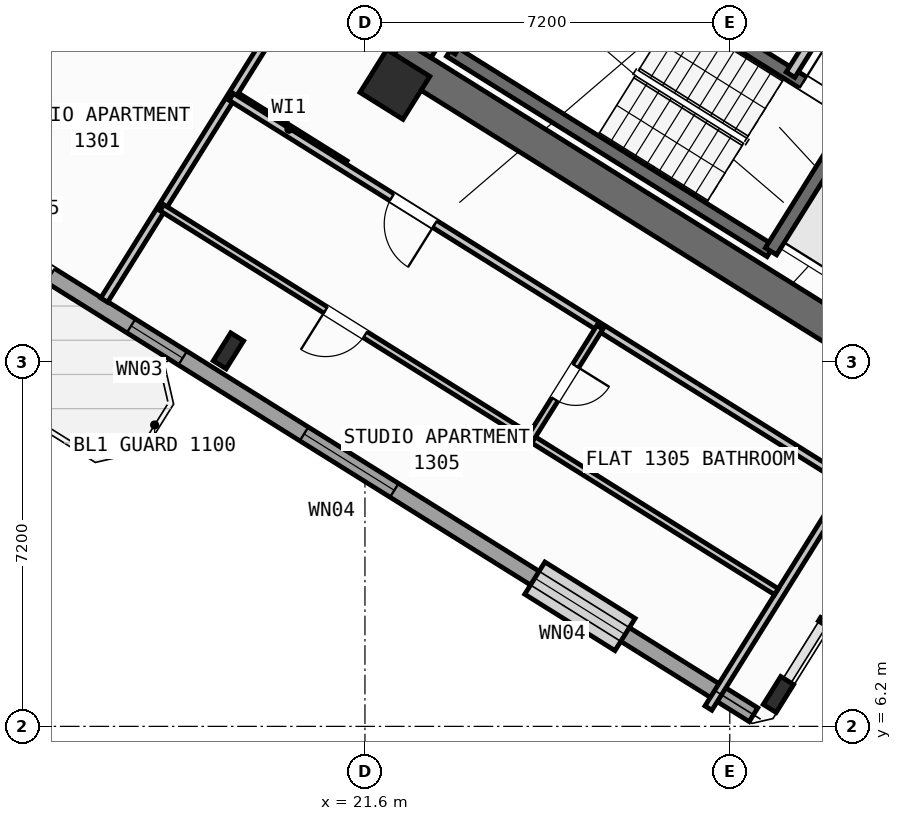
"""IFC4 building model, lengths in metres.
Left out: names, types, materials, properties, quantities, classifications, styles, units other than length and angle.
Written with IfcOpenShell. Run it as: python <this file> out.ifc"""

import sys

from ifc_helpers import new_model, si_unit, direction, frame, frame_2d, origin, origin_2d, place, context, subcontext, project, spatial, rectangle, hollow_rectangle, i_section, extrude, source, transform, mapped, element, fill, save


model = new_model("IFC4")
c1 = context("Model", 3, precision=1e-05, world=origin(), true_north=direction((0.0, 1.0)))
c2 = subcontext(c1, "Body", "Model", "MODEL_VIEW")
j1 = project(units=[si_unit("LENGTHUNIT", "METRE"), si_unit("PLANEANGLEUNIT", "RADIAN")], contexts=[c1])
p1 = place(None, origin())
s1 = spatial("IfcSite", under=j1, at=p1, CompositionType="ELEMENT")
p2 = place(p1, origin())
s2 = spatial("IfcBuilding", under=s1, at=p2, CompositionType="ELEMENT")
p3 = place(p2, frame((0.0, 0.0, 52.8)))
s3 = spatial("IfcBuildingStorey", under=s2, at=p3, CompositionType="ELEMENT", Elevation=52.8)
p4 = place(p3, frame((33.409, 12.45, 0.0), z_axis=(0.0, 0.0, 1.0), x_axis=(-0.848051132073, 0.529914405721, 0.0)))
e1 = element("IfcWall", 1, at=p4, inside=s3, PredefinedType="SHEAR", context=c2, shape_type="SweptSolid", body=[
    extrude(rectangle(XDim=13.24, YDim=0.65, at=frame_2d((6.62, 0.0))), origin(), (0.0, 0.0, 1.0), 3.35),
])
p5 = place(p3, frame((26.007, 24.976, 0.0), z_axis=(0.0, 0.0, 1.0), x_axis=(-0.529916319127, -0.848049936456, 0.0)))
e2 = element("IfcWall", 2, at=p5, inside=s3, PredefinedType="SHEAR", context=c2, shape_type="SweptSolid", body=[
    extrude(rectangle(XDim=6.375, YDim=0.65, at=frame_2d((3.188, 0.0))), origin(), (0.0, 0.0, 1.0), 3.35),
])
m1 = source(origin(), c2, "Body", "SweptSolid", [
    extrude(i_section(OverallWidth=0.3, OverallDepth=0.65, WebThickness=0.016, FlangeThickness=0.031, at=origin_2d()), origin(), (0.0, 0.0, 1.0), 3.6),
])
p6 = place(p3, frame((29.761, 6.829, 0.0), z_axis=(0.0, 0.0, 1.0), x_axis=(-0.848048096156, 0.529919264233, 0.0)))
e3 = element("IfcColumn", 3, at=p6, inside=s3, PredefinedType="COLUMN", context=c2, shape_type="MappedRepresentation", body=[
    mapped(m1, transform((0.0, 0.0, 0.0), scale=1.0)),
])
m2 = source(origin(), c2, "Body", "SweptSolid", [
    extrude(hollow_rectangle(XDim=1.0, YDim=1.0, WallThickness=0.04, at=origin_2d()), origin(), (0.0, 0.0, 1.0), 3.6),
])
p7 = place(p3, frame((22.191, 18.87, 0.0), z_axis=(0.0, 0.0, 1.0), x_axis=(-0.848048096156, 0.529919264233, 0.0)))
e4 = element("IfcColumn", 4, at=p7, inside=s3, PredefinedType="COLUMN", context=c2, shape_type="MappedRepresentation", body=[
    mapped(m2, transform((0.0, 0.0, 0.0), scale=1.0)),
])
p8 = place(p3, frame((18.906, 13.612, 0.0), z_axis=(0.0, 0.0, 1.0), x_axis=(-0.848048096156, 0.529919264233, 0.0)))
e5 = element("IfcColumn", 5, at=p8, inside=s3, PredefinedType="COLUMN", context=c2, shape_type="MappedRepresentation", body=[
    mapped(m1, transform((0.0, 0.0, 0.0), scale=1.0)),
])
p9 = place(p3, frame((29.268, 6.429, 0.0), z_axis=(0.0, 0.0, 1.0), x_axis=(-0.848049971435, 0.529916263149, 0.0)))
e6 = element("IfcWall", 6, at=p9, inside=s3, PredefinedType="STANDARD", context=c2, shape_type="SweptSolid", body=[
    extrude(rectangle(XDim=31.588, YDim=0.32, at=frame_2d((15.794, 0.0))), origin(), (0.0, 0.0, 1.0), 3.35),
])
p10 = place(p9, frame((16.362, 0.0, 0.0)))
e7 = element("IfcOpeningElement", 7, at=p10, cuts=e6, PredefinedType="OPENING", context=c2, shape_type="SweptSolid", body=[
    extrude(rectangle(XDim=1.2, YDim=2.15, at=frame_2d((0.6, 1.075))), frame((0.0, 0.17, 0.0), z_axis=(0.0, -1.0, 0.0), x_axis=(1.0, 0.0, 0.0)), (0.0, 0.0, 1.0), 0.34),
])
p11 = place(p9, frame((2.989, 0.0, 0.8)))
e8 = element("IfcOpeningElement", 8, at=p11, cuts=e6, PredefinedType="OPENING", context=c2, shape_type="SweptSolid", body=[
    extrude(rectangle(XDim=2.1, YDim=1.55, at=frame_2d((1.05, 0.775))), frame((0.0, 0.17, 0.0), z_axis=(0.0, -1.0, 0.0), x_axis=(1.0, 0.0, 0.0)), (0.0, 0.0, 1.0), 0.34),
])
p12 = place(p9, frame((8.359, 0.0, 0.8)))
e9 = element("IfcOpeningElement", 9, at=p12, cuts=e6, PredefinedType="OPENING", context=c2, shape_type="SweptSolid", body=[
    extrude(rectangle(XDim=2.1, YDim=1.55, at=frame_2d((1.05, 0.775))), frame((0.0, 0.17, 0.0), z_axis=(0.0, -1.0, 0.0), x_axis=(1.0, 0.0, 0.0)), (0.0, 0.0, 1.0), 0.34),
])
p13 = place(p9, frame((13.284, 0.0, 0.95)))
e10 = element("IfcOpeningElement", 10, at=p13, cuts=e6, PredefinedType="OPENING", context=c2, shape_type="SweptSolid", body=[
    extrude(rectangle(XDim=1.2, YDim=1.4, at=frame_2d((0.6, 0.7))), frame((0.0, 0.17, 0.0), z_axis=(0.0, -1.0, 0.0), x_axis=(1.0, 0.0, 0.0)), (0.0, 0.0, 1.0), 0.34),
])
p14 = place(p9, frame((20.259, 0.0, 0.95)))
e11 = element("IfcOpeningElement", 11, at=p14, cuts=e6, PredefinedType="OPENING", context=c2, shape_type="SweptSolid", body=[
    extrude(rectangle(XDim=1.2, YDim=1.4, at=frame_2d((0.6, 0.7))), frame((0.0, 0.17, 0.0), z_axis=(0.0, -1.0, 0.0), x_axis=(1.0, 0.0, 0.0)), (0.0, 0.0, 1.0), 0.34),
])
p15 = place(p9, frame((22.929, 0.0, 0.95)))
e12 = element("IfcOpeningElement", 12, at=p15, cuts=e6, PredefinedType="OPENING", context=c2, shape_type="SweptSolid", body=[
    extrude(rectangle(XDim=1.2, YDim=1.4, at=frame_2d((0.6, 0.7))), frame((0.0, 0.17, 0.0), z_axis=(0.0, -1.0, 0.0), x_axis=(1.0, 0.0, 0.0)), (0.0, 0.0, 1.0), 0.34),
])
p16 = place(p9, frame((26.106, 0.0, 0.85)))
e13 = element("IfcOpeningElement", 13, at=p16, cuts=e6, PredefinedType="OPENING", context=c2, shape_type="SweptSolid", body=[
    extrude(rectangle(XDim=1.5, YDim=1.5, at=frame_2d((0.75, 0.75))), frame((0.0, 0.17, 0.0), z_axis=(0.0, -1.0, 0.0), x_axis=(1.0, 0.0, 0.0)), (0.0, 0.0, 1.0), 0.34),
])
p17 = place(p9, frame((29.068, 0.0, 0.85)))
e14 = element("IfcOpeningElement", 14, at=p17, cuts=e6, PredefinedType="OPENING", context=c2, shape_type="SweptSolid", body=[
    extrude(rectangle(XDim=1.8, YDim=1.5, at=frame_2d((0.9, 0.75))), frame((0.0, 0.17, 0.0), z_axis=(0.0, -1.0, 0.0), x_axis=(1.0, 0.0, 0.0)), (0.0, 0.0, 1.0), 0.34),
])
p18 = place(p3, frame((29.605, 15.581, 0.0), z_axis=(0.0, 0.0, 1.0), x_axis=(-0.848036911448, 0.529937163087, 0.0)))
e15 = element("IfcWall", 15, at=p18, inside=s3, PredefinedType="SHEAR", context=c2, shape_type="SweptSolid", body=[
    extrude(rectangle(XDim=7.46, YDim=0.26, at=frame_2d((3.73, 0.0))), origin(), (0.0, 0.0, 1.0), 3.35),
])
p19 = place(p3, frame((31.28, 18.261, 0.0), z_axis=(0.0, 0.0, 1.0), x_axis=(-0.848051618787, 0.529913626805, 0.0)))
e16 = element("IfcWall", 16, at=p19, inside=s3, PredefinedType="SHEAR", context=c2, shape_type="SweptSolid", body=[
    extrude(rectangle(XDim=7.46, YDim=0.26, at=frame_2d((3.73, 0.0))), origin(), (0.0, 0.0, 1.0), 3.35),
])
p20 = place(p19, frame((0.36, 0.0, 0.0)))
e17 = element("IfcOpeningElement", 17, at=p20, cuts=e16, PredefinedType="OPENING", context=c2, shape_type="SweptSolid", body=[
    extrude(rectangle(XDim=0.86, YDim=2.05, at=frame_2d((0.43, 1.025))), frame((0.0, 0.14, 0.0), z_axis=(0.0, -1.0, 0.0), x_axis=(1.0, 0.0, 0.0)), (0.0, 0.0, 1.0), 0.28),
])
p21 = place(p3, frame((31.288, 18.256, 0.0), z_axis=(0.0, 0.0, 1.0), x_axis=(-0.529943379326, -0.848033026897, 0.0)))
e18 = element("IfcWall", 18, at=p21, inside=s3, PredefinedType="SHEAR", context=c2, shape_type="SweptSolid", body=[
    extrude(rectangle(XDim=3.16, YDim=0.26, at=frame_2d((1.58, 0.0))), origin(), (0.0, 0.0, 1.0), 3.35),
])
p22 = place(p3, frame((24.945, 22.22, 0.0), z_axis=(0.0, 0.0, 1.0), x_axis=(-0.529908658664, -0.84805472316, 0.0)))
e19 = element("IfcWall", 19, at=p22, inside=s3, PredefinedType="SHEAR", context=c2, shape_type="SweptSolid", body=[
    extrude(rectangle(XDim=3.16, YDim=0.26, at=frame_2d((1.58, 0.0))), origin(), (0.0, 0.0, 1.0), 3.35),
])
p23 = place(p3, frame((31.525, 21.504, 0.0), z_axis=(0.0, 0.0, 1.0), x_axis=(-0.529907497854, -0.848055448493, 0.0)))
e20 = element("IfcWall", 20, at=p23, inside=s3, PredefinedType="STANDARD", context=c2, shape_type="SweptSolid", body=[
    extrude(rectangle(XDim=2.88, YDim=0.2, at=frame_2d((1.44, 0.0))), origin(), (0.0, 0.0, 1.0), 3.34),
])
p24 = place(p3, frame((21.206, 17.292, 0.0), z_axis=(0.0, 0.0, 1.0), x_axis=(-0.848050851465, 0.529914854792, 0.0)))
e21 = element("IfcWall", 21, at=p24, inside=s3, PredefinedType="PARTITIONING", context=c2, shape_type="SweptSolid", body=[
    extrude(rectangle(XDim=2.61, YDim=0.16, at=frame_2d((1.305, 0.0))), origin(), (0.0, 0.0, 1.0), 3.34),
])
p25 = place(p3, frame((21.938, 23.391, 0.0), z_axis=(0.0, 0.0, 1.0), x_axis=(-0.529924725692, -0.848044683434, 0.0)))
e22 = element("IfcWall", 22, at=p25, inside=s3, PredefinedType="PARTITIONING", context=c2, shape_type="SweptSolid", body=[
    extrude(rectangle(XDim=10.35, YDim=0.16, at=frame_2d((5.175, 0.0))), origin(), (0.0, 0.0, 1.0), 3.34),
])
p26 = place(p3, frame((16.492, 21.827, 0.0), z_axis=(0.0, 0.0, 1.0), x_axis=(-0.529904608059, -0.848057254175, 0.0)))
e23 = element("IfcWall", 23, at=p26, inside=s3, PredefinedType="PARTITIONING", context=c2, shape_type="SweptSolid", body=[
    extrude(rectangle(XDim=5.351, YDim=0.16, at=frame_2d((2.675, 0.0))), origin(), (0.0, 0.0, 1.0), 2.725),
])
p27 = place(p3, frame((32.164, 10.374, 0.0), z_axis=(0.0, 0.0, 1.0), x_axis=(-0.848044107957, 0.529925646633, 0.0)))
e24 = element("IfcWall", 24, at=p27, inside=s3, PredefinedType="PARTITIONING", context=c2, shape_type="SweptSolid", body=[
    extrude(rectangle(XDim=15.57, YDim=0.16, at=frame_2d((7.785, 0.0))), origin(), (0.0, 0.0, 1.0), 3.34),
])
p28 = place(p27, frame((10.83, 0.0, 0.0)))
e25 = element("IfcOpeningElement", 25, at=p28, cuts=e24, PredefinedType="OPENING", context=c2, shape_type="SweptSolid", body=[
    extrude(rectangle(XDim=1.0, YDim=2.1, at=frame_2d((0.5, 1.05))), frame((0.0, 0.09, 0.0), z_axis=(0.0, -1.0, 0.0), x_axis=(1.0, 0.0, 0.0)), (0.0, 0.0, 1.0), 0.18),
])
p29 = place(p3, frame((31.282, 11.208, 0.0), z_axis=(0.0, 0.0, 1.0), x_axis=(-0.529938869374, -0.84803584519, 0.0)))
e26 = element("IfcWall", 26, at=p29, inside=s3, PredefinedType="PARTITIONING", context=c2, shape_type="SweptSolid", body=[
    extrude(rectangle(XDim=5.48, YDim=0.16, at=frame_2d((2.74, 0.0))), origin(), (0.0, 0.0, 1.0), 3.34),
])
p30 = place(p3, frame((29.72, 8.859, 0.0), z_axis=(0.0, 0.0, 1.0), x_axis=(-0.848049134363, 0.529917602752, 0.0)))
e27 = element("IfcWall", 27, at=p30, inside=s3, PredefinedType="PLUMBINGWALL", context=c2, shape_type="SweptSolid", body=[
    extrude(rectangle(XDim=14.3, YDim=0.14, at=frame_2d((7.15, 0.0))), origin(), (0.0, 0.0, 1.0), 3.34),
])
p31 = place(p30, frame((9.57, 0.0, 0.0)))
e28 = element("IfcOpeningElement", 28, at=p31, cuts=e27, PredefinedType="OPENING", context=c2, shape_type="SweptSolid", body=[
    extrude(rectangle(XDim=0.92, YDim=2.08, at=frame_2d((0.46, 1.04))), frame((0.0, 0.08, 0.0), z_axis=(0.0, -1.0, 0.0), x_axis=(1.0, 0.0, 0.0)), (0.0, 0.0, 1.0), 0.16),
])
p32 = place(p3, frame((26.237, 14.078, 0.0), z_axis=(0.0, 0.0, 1.0), x_axis=(-0.52995640672, -0.848024885824, 0.0)))
e29 = element("IfcWall", 29, at=p32, inside=s3, PredefinedType="PLUMBINGWALL", context=c2, shape_type="SweptSolid", body=[
    extrude(rectangle(XDim=2.58, YDim=0.14, at=frame_2d((1.29, 0.0))), origin(), (0.0, 0.0, 1.0), 3.34),
])
p33 = place(p32, frame((0.9, 0.0, 0.0)))
e30 = element("IfcOpeningElement", 30, at=p33, cuts=e29, PredefinedType="OPENING", context=c2, shape_type="SweptSolid", body=[
    extrude(rectangle(XDim=0.78, YDim=2.05, at=frame_2d((0.39, 1.025))), frame((0.0, 0.08, 0.0), z_axis=(0.0, -1.0, 0.0), x_axis=(1.0, 0.0, 0.0)), (0.0, 0.0, 1.0), 0.16),
])
m3 = source(origin(), c2, "Body", "SweptSolid", [
    extrude(rectangle(XDim=2.1, YDim=1.55, at=frame_2d((1.05, 0.775))), frame((0.0, 0.03, 0.0), z_axis=(0.0, -1.0, 0.0), x_axis=(1.0, 0.0, 0.0)), (0.0, 0.0, 1.0), 0.06),
])
p34 = place(p11, origin())
e31 = element("IfcWindow", 31, at=p34, inside=s3, PartitioningType="SINGLE_PANEL", PredefinedType="WINDOW", context=c2, shape_type="MappedRepresentation", body=[
    mapped(m3, transform((0.0, 0.0, 0.0), scale=1.0)),
])
fill(e8, e31)
p35 = place(p12, origin())
e32 = element("IfcWindow", 32, at=p35, inside=s3, PartitioningType="SINGLE_PANEL", PredefinedType="WINDOW", context=c2, shape_type="MappedRepresentation", body=[
    mapped(m3, transform((0.0, 0.0, 0.0), scale=1.0)),
])
fill(e9, e32)
m4 = source(origin(), c2, "Body", "SweptSolid", [
    extrude(rectangle(XDim=1.2, YDim=1.4, at=frame_2d((0.6, 0.7))), frame((0.0, 0.03, 0.0), z_axis=(0.0, -1.0, 0.0), x_axis=(1.0, 0.0, 0.0)), (0.0, 0.0, 1.0), 0.06),
])
p36 = place(p13, origin())
e33 = element("IfcWindow", 33, at=p36, inside=s3, PartitioningType="SINGLE_PANEL", PredefinedType="WINDOW", context=c2, shape_type="MappedRepresentation", body=[
    mapped(m4, transform((0.0, 0.0, 0.0), scale=1.0)),
])
fill(e10, e33)
m5 = source(origin(), c2, "Body", "SweptSolid", [
    extrude(rectangle(XDim=0.86, YDim=2.05, at=frame_2d((0.43, 1.025))), frame((0.0, 0.025, 0.0), z_axis=(0.0, -1.0, 0.0), x_axis=(1.0, 0.0, 0.0)), (0.0, 0.0, 1.0), 0.05),
])
p37 = place(p20, frame((0.86, 0.0, 0.0), z_axis=(0.0, 0.0, 1.0), x_axis=(-1.0, 0.0, 0.0)))
e34 = element("IfcDoor", 34, at=p37, inside=s3, OperationType="SINGLE_SWING_LEFT", PredefinedType="DOOR", context=c2, shape_type="MappedRepresentation", body=[
    mapped(m5, transform((0.0, 0.0, 0.0), scale=1.0)),
])
fill(e17, e34)
m6 = source(origin(), c2, "Body", "SweptSolid", [
    extrude(rectangle(XDim=1.0, YDim=2.1, at=frame_2d((0.5, 1.05))), frame((0.0, 0.025, 0.0), z_axis=(0.0, -1.0, 0.0), x_axis=(1.0, 0.0, 0.0)), (0.0, 0.0, 1.0), 0.05),
])
p38 = place(p28, origin())
e35 = element("IfcDoor", 35, at=p38, inside=s3, OperationType="SINGLE_SWING_LEFT", PredefinedType="DOOR", context=c2, shape_type="MappedRepresentation", body=[
    mapped(m6, transform((0.0, 0.0, 0.0), scale=1.0)),
])
fill(e25, e35)
m7 = source(origin(), c2, "Body", "SweptSolid", [
    extrude(rectangle(XDim=0.92, YDim=2.08, at=frame_2d((0.46, 1.04))), frame((0.0, 0.025, 0.0), z_axis=(0.0, -1.0, 0.0), x_axis=(1.0, 0.0, 0.0)), (0.0, 0.0, 1.0), 0.05),
])
p39 = place(p31, origin())
e36 = element("IfcDoor", 36, at=p39, inside=s3, OperationType="SINGLE_SWING_RIGHT", PredefinedType="DOOR", context=c2, shape_type="MappedRepresentation", body=[
    mapped(m7, transform((0.0, 0.0, 0.0), scale=1.0)),
])
fill(e28, e36)
m8 = source(origin(), c2, "Body", "SweptSolid", [
    extrude(rectangle(XDim=0.78, YDim=2.05, at=frame_2d((0.39, 1.025))), frame((0.0, 0.025, 0.0), z_axis=(0.0, -1.0, 0.0), x_axis=(1.0, 0.0, 0.0)), (0.0, 0.0, 1.0), 0.05),
])
p40 = place(p33, origin())
e37 = element("IfcDoor", 37, at=p40, inside=s3, OperationType="SINGLE_SWING_LEFT", PredefinedType="DOOR", context=c2, shape_type="MappedRepresentation", body=[
    mapped(m8, transform((0.0, 0.0, 0.0), scale=1.0)),
])
fill(e30, e37)
save(model, sys.argv[1])
